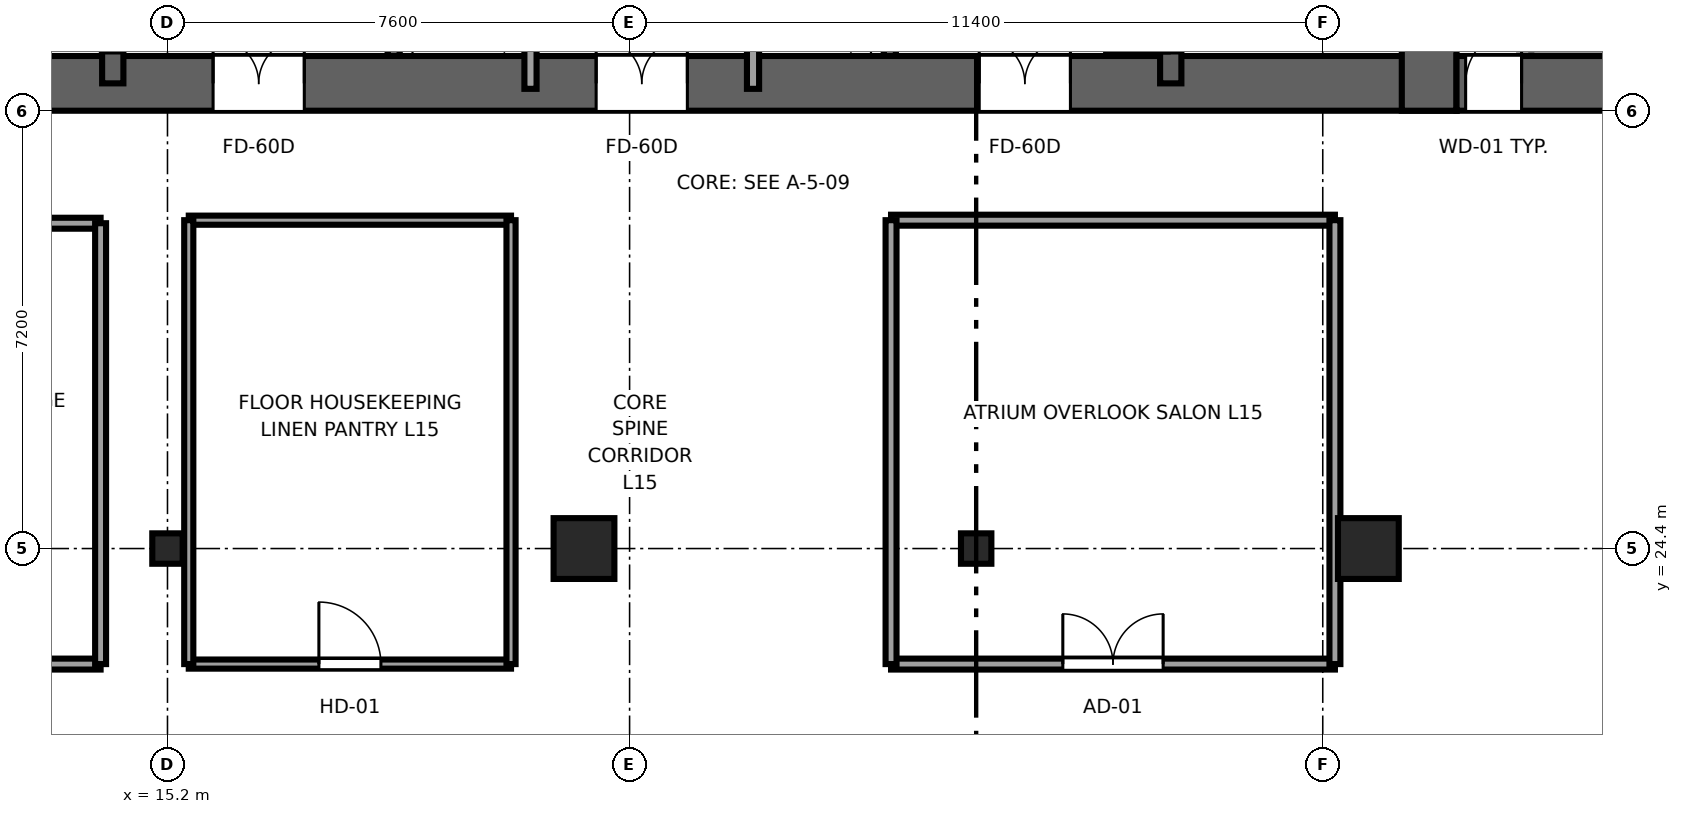
"""IFC4 building model, lengths in metres.
Left out: names, types, materials, properties, quantities, classifications, styles, units other than length and angle.
Written with IfcOpenShell. Run it as: python <this file> out.ifc"""

import sys

from ifc_helpers import new_model, si_unit, direction, frame, frame_2d, origin, origin_2d, place, context, subcontext, project, spatial, rectangle, i_section, extrude, source, transform, mapped, element, fill, save


model = new_model("IFC4")
c1 = context("Model", 3, precision=1e-05, world=origin(), true_north=direction((0.0, 1.0)))
c2 = subcontext(c1, "Body", "Model", "MODEL_VIEW")
j1 = project(units=[si_unit("LENGTHUNIT", "METRE"), si_unit("PLANEANGLEUNIT", "RADIAN")], contexts=[c1])
p1 = place(None, origin())
s1 = spatial("IfcSite", under=j1, at=p1, CompositionType="ELEMENT")
p2 = place(p1, origin())
s2 = spatial("IfcBuilding", under=s1, at=p2, CompositionType="ELEMENT")
p3 = place(p2, frame((0.0, 0.0, 63.95)))
s3 = spatial("IfcBuildingStorey", under=s2, at=p3, CompositionType="ELEMENT", Elevation=63.95)
p4 = place(p3, frame((9.6, 32.05, 0.0), z_axis=(0.0, 0.0, 1.0), x_axis=(1.0, 0.0, 0.0)))
e1 = element("IfcWall", 1, at=p4, inside=s3, PredefinedType="SHEAR", context=c2, shape_type="SweptSolid", body=[
    extrude(rectangle(XDim=26.8, YDim=0.9, at=frame_2d((13.4, 0.0))), origin(), (0.0, 0.0, 1.0), 3.55),
])
p5 = place(p4, frame((7.85, 0.0, 0.0), z_axis=(0.0, 0.0, 1.0), x_axis=(-1.0, 0.0, 0.0)))
e2 = element("IfcOpeningElement", 2, at=p5, cuts=e1, PredefinedType="OPENING", context=c2, shape_type="SweptSolid", body=[
    extrude(rectangle(XDim=1.5, YDim=2.04, at=frame_2d((0.75, 1.02))), frame((0.0, 0.46, 0.0), z_axis=(0.0, -1.0, 0.0), x_axis=(1.0, 0.0, 0.0)), (0.0, 0.0, 1.0), 0.92),
])
p6 = place(p4, frame((14.15, 0.0, 0.0), z_axis=(0.0, 0.0, 1.0), x_axis=(-1.0, 0.0, 0.0)))
e3 = element("IfcOpeningElement", 3, at=p6, cuts=e1, PredefinedType="OPENING", context=c2, shape_type="SweptSolid", body=[
    extrude(rectangle(XDim=1.5, YDim=2.04, at=frame_2d((0.75, 1.02))), frame((0.0, 0.46, 0.0), z_axis=(0.0, -1.0, 0.0), x_axis=(1.0, 0.0, 0.0)), (0.0, 0.0, 1.0), 0.92),
])
p7 = place(p4, frame((20.45, 0.0, 0.0), z_axis=(0.0, 0.0, 1.0), x_axis=(-1.0, 0.0, 0.0)))
e4 = element("IfcOpeningElement", 4, at=p7, cuts=e1, PredefinedType="OPENING", context=c2, shape_type="SweptSolid", body=[
    extrude(rectangle(XDim=1.5, YDim=2.04, at=frame_2d((0.75, 1.02))), frame((0.0, 0.46, 0.0), z_axis=(0.0, -1.0, 0.0), x_axis=(1.0, 0.0, 0.0)), (0.0, 0.0, 1.0), 0.92),
])
p8 = place(p3, frame((35.95, 31.6, 0.0), z_axis=(0.0, 0.0, 1.0), x_axis=(0.0, 1.0, 0.0)))
e5 = element("IfcWall", 5, at=p8, inside=s3, PredefinedType="SHEAR", context=c2, shape_type="SweptSolid", body=[
    extrude(rectangle(XDim=13.6, YDim=0.9, at=frame_2d((6.8, 0.0))), origin(), (0.0, 0.0, 1.0), 3.55),
])
p9 = place(p3, frame((14.3, 32.05, 0.0), z_axis=(0.0, 0.0, 1.0), x_axis=(0.0, 1.0, 0.0)))
e6 = element("IfcWall", 6, at=p9, inside=s3, PredefinedType="SHEAR", context=c2, shape_type="SweptSolid", body=[
    extrude(rectangle(XDim=12.7, YDim=0.35, at=frame_2d((6.35, 0.0))), origin(), (0.0, 0.0, 1.0), 3.55),
])
p10 = place(p9, frame((0.5, 0.0, 0.0)))
e7 = element("IfcOpeningElement", 7, at=p10, cuts=e6, PredefinedType="OPENING", context=c2, shape_type="SweptSolid", body=[
    extrude(rectangle(XDim=1.1, YDim=2.12, at=frame_2d((0.55, 1.06))), frame((0.0, 0.185, 0.0), z_axis=(0.0, -1.0, 0.0), x_axis=(1.0, 0.0, 0.0)), (0.0, 0.0, 1.0), 0.37),
])
p11 = place(p3, frame((31.7, 32.05, 0.0), z_axis=(0.0, 0.0, 1.0), x_axis=(0.0, 1.0, 0.0)))
e8 = element("IfcWall", 8, at=p11, inside=s3, PredefinedType="SHEAR", context=c2, shape_type="SweptSolid", body=[
    extrude(rectangle(XDim=12.7, YDim=0.35, at=frame_2d((6.35, 0.0))), origin(), (0.0, 0.0, 1.0), 3.55),
])
p12 = place(p11, frame((1.6, 0.0, 0.0), z_axis=(0.0, 0.0, 1.0), x_axis=(-1.0, 0.0, 0.0)))
e9 = element("IfcOpeningElement", 9, at=p12, cuts=e8, PredefinedType="OPENING", context=c2, shape_type="SweptSolid", body=[
    extrude(rectangle(XDim=1.1, YDim=2.12, at=frame_2d((0.55, 1.06))), frame((0.0, 0.185, 0.0), z_axis=(0.0, -1.0, 0.0), x_axis=(1.0, 0.0, 0.0)), (0.0, 0.0, 1.0), 0.37),
])
p13 = place(p3, frame((36.4, 32.05, 0.0), z_axis=(0.0, 0.0, 1.0), x_axis=(1.0, 0.0, 0.0)))
e10 = element("IfcWall", 10, at=p13, inside=s3, PredefinedType="SHEAR", context=c2, shape_type="SweptSolid", body=[
    extrude(rectangle(XDim=4.0, YDim=0.9, at=frame_2d((2.0, 0.0))), origin(), (0.0, 0.0, 1.0), 3.55),
])
p14 = place(p13, frame((1.07, 0.0, 0.0), z_axis=(0.0, 0.0, 1.0), x_axis=(-1.0, 0.0, 0.0)))
e11 = element("IfcOpeningElement", 11, at=p14, cuts=e10, PredefinedType="OPENING", context=c2, shape_type="SweptSolid", body=[
    extrude(rectangle(XDim=0.92, YDim=2.01, at=frame_2d((0.46, 1.005))), frame((0.0, 0.46, 0.0), z_axis=(0.0, -1.0, 0.0), x_axis=(1.0, 0.0, 0.0)), (0.0, 0.0, 1.0), 0.92),
])
m1 = source(origin(), c2, "Body", "SweptSolid", [
    extrude(i_section(OverallWidth=0.5, OverallDepth=0.5, WebThickness=0.028, FlangeThickness=0.045, at=origin_2d()), origin(), (0.0, 0.0, 1.0), 3.55),
])
p15 = place(p3, frame((15.2, 24.4, 0.0), z_axis=(0.0, 0.0, 1.0), x_axis=(1.0, 0.0, 0.0)))
e12 = element("IfcColumn", 12, at=p15, inside=s3, PredefinedType="COLUMN", context=c2, shape_type="MappedRepresentation", body=[
    mapped(m1, transform((0.0, 0.0, 0.0), x_axis=(1.0, 0.0, 0.0), y_axis=(0.0, 1.0, 0.0), z_axis=(0.0, 0.0, 1.0), scale=1.0)),
])
m2 = source(origin(), c2, "Body", "SweptSolid", [
    extrude(rectangle(XDim=1.0, YDim=1.0, at=origin_2d()), origin(), (0.0, 0.0, 1.0), 3.55),
])
for number, where, z_axis, x_axis in (
    (13, (22.05, 24.4, 0.0), (0.0, 0.0, 1.0), (1.0, 0.0, 0.0)),
    (14, (34.95, 24.4, 0.0), (0.0, 0.0, 1.0), (1.0, 0.0, 0.0)),
):
    element("IfcColumn", number, at=place(p3, frame(where, z_axis=z_axis, x_axis=x_axis)), inside=s3, PredefinedType="COLUMN", context=c2, shape_type="MappedRepresentation", body=[
        mapped(m2, transform((0.0, 0.0, 0.0), x_axis=(1.0, 0.0, 0.0), y_axis=(0.0, 1.0, 0.0), z_axis=(0.0, 0.0, 1.0), scale=1.0)),
    ])
p16 = place(p3, frame((28.5, 24.4, 0.0), z_axis=(0.0, 0.0, 1.0), x_axis=(1.0, 0.0, 0.0)))
e15 = element("IfcColumn", 15, at=p16, inside=s3, PredefinedType="COLUMN", context=c2, shape_type="MappedRepresentation", body=[
    mapped(m1, transform((0.0, 0.0, 0.0), x_axis=(1.0, 0.0, 0.0), y_axis=(0.0, 1.0, 0.0), z_axis=(0.0, 0.0, 1.0), scale=1.0)),
])
for number, where, z_axis, x_axis in (
    (16, (18.92, 32.504, 0.0), (0.0, 0.0, 1.0), (0.0, 1.0, 0.0)),
    (17, (27.08, 32.504, 0.0), (0.0, 0.0, 1.0), (0.0, 1.0, 0.0)),
):
    element("IfcWall", number, at=place(p3, frame(where, z_axis=z_axis, x_axis=x_axis)), inside=s3, PredefinedType="SOLIDWALL", context=c2, shape_type="SweptSolid", body=[
        extrude(rectangle(XDim=3.646, YDim=0.2, at=frame_2d((1.823, 0.0))), origin(), (0.0, 0.0, 1.0), 3.37),
    ])
for number, where, z_axis, x_axis in (
    (18, (21.17, 31.96, 0.0), (0.0, 0.0, 1.0), (0.0, 1.0, 0.0)),
    (19, (24.83, 31.96, 0.0), (0.0, 0.0, 1.0), (0.0, 1.0, 0.0)),
):
    element("IfcWall", number, at=place(p3, frame(where, z_axis=z_axis, x_axis=x_axis)), inside=s3, PredefinedType="SOLIDWALL", context=c2, shape_type="SweptSolid", body=[
        extrude(rectangle(XDim=12.58, YDim=0.2, at=frame_2d((6.29, 0.0))), origin(), (0.0, 0.0, 1.0), 3.37),
    ])
p17 = place(p3, frame((9.88, 22.5, 0.0), z_axis=(0.0, 0.0, 1.0), x_axis=(1.0, 0.0, 0.0)))
e20 = element("IfcWall", 20, at=p17, inside=s3, PredefinedType="PARTITIONING", context=c2, shape_type="SweptSolid", body=[
    extrude(rectangle(XDim=4.22, YDim=0.18, at=frame_2d((2.11, 0.0))), origin(), (0.0, 0.0, 1.0), 3.37),
])
p18 = place(p17, frame((1.285, 0.0, 0.0)))
e21 = element("IfcOpeningElement", 21, at=p18, cuts=e20, PredefinedType="OPENING", context=c2, shape_type="SweptSolid", body=[
    extrude(rectangle(XDim=1.65, YDim=2.15, at=frame_2d((0.825, 1.075))), frame((0.0, 0.1, 0.0), z_axis=(0.0, -1.0, 0.0), x_axis=(1.0, 0.0, 0.0)), (0.0, 0.0, 1.0), 0.2),
])
p19 = place(p3, frame((9.88, 29.75, 0.0), z_axis=(0.0, 0.0, 1.0), x_axis=(1.0, 0.0, 0.0)))
e22 = element("IfcWall", 22, at=p19, inside=s3, PredefinedType="PARTITIONING", context=c2, shape_type="SweptSolid", body=[
    extrude(rectangle(XDim=4.22, YDim=0.18, at=frame_2d((2.11, 0.0))), origin(), (0.0, 0.0, 1.0), 3.37),
])
p20 = place(p3, frame((14.1, 22.5, 0.0), z_axis=(0.0, 0.0, 1.0), x_axis=(0.0, 1.0, 0.0)))
e23 = element("IfcWall", 23, at=p20, inside=s3, PredefinedType="PARTITIONING", context=c2, shape_type="SweptSolid", body=[
    extrude(rectangle(XDim=7.25, YDim=0.18, at=frame_2d((3.625, 0.0))), origin(), (0.0, 0.0, 1.0), 3.37),
])
p21 = place(p3, frame((27.1, 22.5, 0.0), z_axis=(0.0, 0.0, 1.0), x_axis=(1.0, 0.0, 0.0)))
e24 = element("IfcWall", 24, at=p21, inside=s3, PredefinedType="PARTITIONING", context=c2, shape_type="SweptSolid", body=[
    extrude(rectangle(XDim=7.3, YDim=0.18, at=frame_2d((3.65, 0.0))), origin(), (0.0, 0.0, 1.0), 3.37),
])
p22 = place(p21, frame((2.825, 0.0, 0.0)))
e25 = element("IfcOpeningElement", 25, at=p22, cuts=e24, PredefinedType="OPENING", context=c2, shape_type="SweptSolid", body=[
    extrude(rectangle(XDim=1.65, YDim=2.15, at=frame_2d((0.825, 1.075))), frame((0.0, 0.1, 0.0), z_axis=(0.0, -1.0, 0.0), x_axis=(1.0, 0.0, 0.0)), (0.0, 0.0, 1.0), 0.2),
])
p23 = place(p3, frame((27.1, 29.8, 0.0), z_axis=(0.0, 0.0, 1.0), x_axis=(1.0, 0.0, 0.0)))
e26 = element("IfcWall", 26, at=p23, inside=s3, PredefinedType="PARTITIONING", context=c2, shape_type="SweptSolid", body=[
    extrude(rectangle(XDim=7.3, YDim=0.18, at=frame_2d((3.65, 0.0))), origin(), (0.0, 0.0, 1.0), 3.37),
])
for number, where, z_axis, x_axis in (
    (27, (27.1, 22.5, 0.0), (0.0, 0.0, 1.0), (0.0, 1.0, 0.0)),
    (28, (34.4, 22.5, 0.0), (0.0, 0.0, 1.0), (0.0, 1.0, 0.0)),
):
    element("IfcWall", number, at=place(p3, frame(where, z_axis=z_axis, x_axis=x_axis)), inside=s3, PredefinedType="PARTITIONING", context=c2, shape_type="SweptSolid", body=[
        extrude(rectangle(XDim=7.3, YDim=0.18, at=frame_2d((3.65, 0.0))), origin(), (0.0, 0.0, 1.0), 3.37),
    ])
p24 = place(p3, frame((15.55, 22.5, 0.0), z_axis=(0.0, 0.0, 1.0), x_axis=(1.0, 0.0, 0.0)))
e29 = element("IfcWall", 29, at=p24, inside=s3, PredefinedType="PARTITIONING", context=c2, shape_type="SweptSolid", body=[
    extrude(rectangle(XDim=5.3, YDim=0.15, at=frame_2d((2.65, 0.0))), origin(), (0.0, 0.0, 1.0), 3.37),
])
p25 = place(p24, frame((2.14, 0.0, 0.0)))
e30 = element("IfcOpeningElement", 30, at=p25, cuts=e29, PredefinedType="OPENING", context=c2, shape_type="SweptSolid", body=[
    extrude(rectangle(XDim=1.02, YDim=2.03, at=frame_2d((0.51, 1.015))), frame((0.0, 0.085, 0.0), z_axis=(0.0, -1.0, 0.0), x_axis=(1.0, 0.0, 0.0)), (0.0, 0.0, 1.0), 0.17),
])
p26 = place(p3, frame((15.55, 29.8, 0.0), z_axis=(0.0, 0.0, 1.0), x_axis=(1.0, 0.0, 0.0)))
e31 = element("IfcWall", 31, at=p26, inside=s3, PredefinedType="PARTITIONING", context=c2, shape_type="SweptSolid", body=[
    extrude(rectangle(XDim=5.3, YDim=0.15, at=frame_2d((2.65, 0.0))), origin(), (0.0, 0.0, 1.0), 3.37),
])
for number, where, z_axis, x_axis in (
    (32, (15.55, 22.5, 0.0), (0.0, 0.0, 1.0), (0.0, 1.0, 0.0)),
    (33, (20.85, 22.5, 0.0), (0.0, 0.0, 1.0), (0.0, 1.0, 0.0)),
):
    element("IfcWall", number, at=place(p3, frame(where, z_axis=z_axis, x_axis=x_axis)), inside=s3, PredefinedType="PARTITIONING", context=c2, shape_type="SweptSolid", body=[
        extrude(rectangle(XDim=7.3, YDim=0.15, at=frame_2d((3.65, 0.0))), origin(), (0.0, 0.0, 1.0), 3.37),
    ])
m3 = source(origin(), c2, "Body", "SweptSolid", [
    extrude(rectangle(XDim=1.1, YDim=2.12, at=frame_2d((0.55, 1.06))), frame((0.0, 0.025, 0.0), z_axis=(0.0, -1.0, 0.0), x_axis=(1.0, 0.0, 0.0)), (0.0, 0.0, 1.0), 0.05),
])
p27 = place(p10, origin())
e34 = element("IfcDoor", 34, at=p27, inside=s3, OperationType="SINGLE_SWING_RIGHT", PredefinedType="DOOR", context=c2, shape_type="MappedRepresentation", body=[
    mapped(m3, transform((0.0, 0.0, 0.0), x_axis=(1.0, 0.0, 0.0), y_axis=(0.0, 1.0, 0.0), z_axis=(0.0, 0.0, 1.0), scale=1.0)),
])
fill(e7, e34)
p28 = place(p12, origin())
e35 = element("IfcDoor", 35, at=p28, inside=s3, OperationType="SINGLE_SWING_LEFT", PredefinedType="DOOR", context=c2, shape_type="MappedRepresentation", body=[
    mapped(m3, transform((0.0, 0.0, 0.0), x_axis=(1.0, 0.0, 0.0), y_axis=(0.0, 1.0, 0.0), z_axis=(0.0, 0.0, 1.0), scale=1.0)),
])
fill(e9, e35)
m4 = source(origin(), c2, "Body", "SweptSolid", [
    extrude(rectangle(XDim=1.5, YDim=2.04, at=frame_2d((0.75, 1.02))), frame((0.0, 0.025, 0.0), z_axis=(0.0, -1.0, 0.0), x_axis=(1.0, 0.0, 0.0)), (0.0, 0.0, 1.0), 0.05),
])
p29 = place(p5, origin())
e36 = element("IfcDoor", 36, at=p29, inside=s3, OperationType="DOUBLE_DOOR_SINGLE_SWING", PredefinedType="DOOR", context=c2, shape_type="MappedRepresentation", body=[
    mapped(m4, transform((0.0, 0.0, 0.0), x_axis=(1.0, 0.0, 0.0), y_axis=(0.0, 1.0, 0.0), z_axis=(0.0, 0.0, 1.0), scale=1.0)),
])
fill(e2, e36)
p30 = place(p6, origin())
e37 = element("IfcDoor", 37, at=p30, inside=s3, OperationType="DOUBLE_DOOR_SINGLE_SWING", PredefinedType="DOOR", context=c2, shape_type="MappedRepresentation", body=[
    mapped(m4, transform((0.0, 0.0, 0.0), x_axis=(1.0, 0.0, 0.0), y_axis=(0.0, 1.0, 0.0), z_axis=(0.0, 0.0, 1.0), scale=1.0)),
])
fill(e3, e37)
p31 = place(p7, origin())
e38 = element("IfcDoor", 38, at=p31, inside=s3, OperationType="DOUBLE_DOOR_SINGLE_SWING", PredefinedType="DOOR", context=c2, shape_type="MappedRepresentation", body=[
    mapped(m4, transform((0.0, 0.0, 0.0), x_axis=(1.0, 0.0, 0.0), y_axis=(0.0, 1.0, 0.0), z_axis=(0.0, 0.0, 1.0), scale=1.0)),
])
fill(e4, e38)
m5 = source(origin(), c2, "Body", "SweptSolid", [
    extrude(rectangle(XDim=0.92, YDim=2.01, at=frame_2d((0.46, 1.005))), frame((0.0, 0.025, 0.0), z_axis=(0.0, -1.0, 0.0), x_axis=(1.0, 0.0, 0.0)), (0.0, 0.0, 1.0), 0.05),
])
p32 = place(p14, origin())
e39 = element("IfcDoor", 39, at=p32, inside=s3, OperationType="SINGLE_SWING_RIGHT", PredefinedType="DOOR", context=c2, shape_type="MappedRepresentation", body=[
    mapped(m5, transform((0.0, 0.0, 0.0), x_axis=(1.0, 0.0, 0.0), y_axis=(0.0, 1.0, 0.0), z_axis=(0.0, 0.0, 1.0), scale=1.0)),
])
fill(e11, e39)
m6 = source(origin(), c2, "Body", "SweptSolid", [
    extrude(rectangle(XDim=1.65, YDim=2.15, at=frame_2d((0.825, 1.075))), frame((0.0, 0.025, 0.0), z_axis=(0.0, -1.0, 0.0), x_axis=(1.0, 0.0, 0.0)), (0.0, 0.0, 1.0), 0.05),
])
p33 = place(p22, origin())
e40 = element("IfcDoor", 40, at=p33, inside=s3, OperationType="DOUBLE_DOOR_SINGLE_SWING", PredefinedType="DOOR", context=c2, shape_type="MappedRepresentation", body=[
    mapped(m6, transform((0.0, 0.0, 0.0), x_axis=(1.0, 0.0, 0.0), y_axis=(0.0, 1.0, 0.0), z_axis=(0.0, 0.0, 1.0), scale=1.0)),
])
fill(e25, e40)
m7 = source(origin(), c2, "Body", "SweptSolid", [
    extrude(rectangle(XDim=1.02, YDim=2.03, at=frame_2d((0.51, 1.015))), frame((0.0, 0.025, 0.0), z_axis=(0.0, -1.0, 0.0), x_axis=(1.0, 0.0, 0.0)), (0.0, 0.0, 1.0), 0.05),
])
p34 = place(p25, origin())
e41 = element("IfcDoor", 41, at=p34, inside=s3, OperationType="SINGLE_SWING_LEFT", PredefinedType="DOOR", context=c2, shape_type="MappedRepresentation", body=[
    mapped(m7, transform((0.0, 0.0, 0.0), x_axis=(1.0, 0.0, 0.0), y_axis=(0.0, 1.0, 0.0), z_axis=(0.0, 0.0, 1.0), scale=1.0)),
])
fill(e30, e41)
save(model, sys.argv[1])
